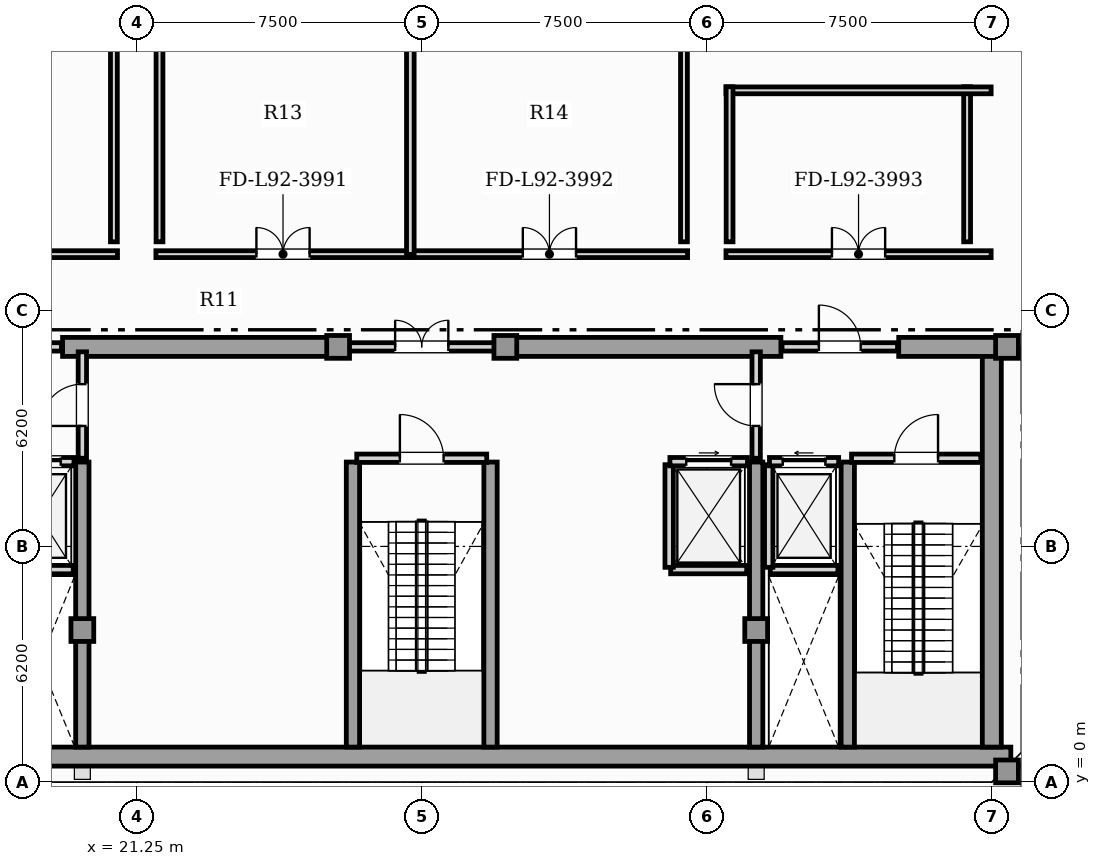
"""IFC4 building model, lengths in metres.
Left out: names, types, materials, properties, quantities, classifications, styles, units other than length and angle.
Written with IfcOpenShell. Run it as: python <this file> out.ifc"""

import sys

from ifc_helpers import new_model, si_unit, direction, frame, frame_2d, origin, origin_2d, place, context, subcontext, project, spatial, rectangle, hollow_rectangle, extrude, element, fill, save


model = new_model("IFC4")
c1 = context("Model", 3, precision=1e-05, world=origin(), true_north=direction((0.0, 1.0)))
c2 = subcontext(c1, "Body", "Model", "MODEL_VIEW")
j1 = project(units=[si_unit("LENGTHUNIT", "METRE"), si_unit("PLANEANGLEUNIT", "RADIAN")], contexts=[c1])
p1 = place(None, origin())
s1 = spatial("IfcSite", under=j1, at=p1, CompositionType="ELEMENT")
p2 = place(p1, origin())
s2 = spatial("IfcBuilding", under=s1, at=p2, CompositionType="ELEMENT")
p3 = place(p2, frame((0.0, 0.0, 377.45)))
s3 = spatial("IfcBuildingStorey", under=s2, at=p3, CompositionType="ELEMENT", Elevation=377.45)
p4 = place(p3, frame((13.25, 0.67, 0.0), z_axis=(0.0, 0.0, 1.0), x_axis=(1.0, 0.0, 0.0)))
e1 = element("IfcWall", 1, at=p4, inside=s3, PredefinedType="SHEAR", context=c2, shape_type="SweptSolid", body=[
    extrude(rectangle(XDim=31.0, YDim=0.5, at=frame_2d((15.5, 0.0))), origin(), (0.0, 0.0, 1.0), 5.1),
])
p5 = place(p3, frame((43.75, 0.92, 0.0), z_axis=(0.0, 0.0, 1.0), x_axis=(0.0, 1.0, 0.0)))
e2 = element("IfcWall", 2, at=p5, inside=s3, PredefinedType="SHEAR", context=c2, shape_type="SweptSolid", body=[
    extrude(rectangle(XDim=10.53, YDim=0.5, at=frame_2d((5.265, 0.0))), origin(), (0.0, 0.0, 1.0), 5.1),
])
for number, where, z_axis, x_axis in (
    (3, (19.3, 11.45, 0.0), (0.0, 0.0, 1.0), (1.0, 0.0, 0.0)),
    (4, (30.9, 11.45, 0.0), (0.0, 0.0, 1.0), (1.0, 0.0, 0.0)),
):
    element("IfcWall", number, at=place(p3, frame(where, z_axis=z_axis, x_axis=x_axis)), inside=s3, PredefinedType="SHEAR", context=c2, shape_type="SweptSolid", body=[
        extrude(rectangle(XDim=7.3, YDim=0.5, at=frame_2d((3.65, 0.0))), origin(), (0.0, 0.0, 1.0), 5.1),
    ])
p6 = place(p3, frame((41.3, 11.45, 0.0), z_axis=(0.0, 0.0, 1.0), x_axis=(1.0, 0.0, 0.0)))
e5 = element("IfcWall", 5, at=p6, inside=s3, PredefinedType="SHEAR", context=c2, shape_type="SweptSolid", body=[
    extrude(rectangle(XDim=2.95, YDim=0.5, at=frame_2d((1.475, 0.0))), origin(), (0.0, 0.0, 1.0), 5.1),
])
for number, where, z_axis, x_axis in (
    (6, (19.82, 0.92, 0.0), (0.0, 0.0, 1.0), (0.0, 1.0, 0.0)),
    (7, (26.94, 0.92, 0.0), (0.0, 0.0, 1.0), (0.0, 1.0, 0.0)),
    (8, (30.56, 0.92, 0.0), (0.0, 0.0, 1.0), (0.0, 1.0, 0.0)),
    (9, (37.55, 0.92, 0.0), (0.0, 0.0, 1.0), (0.0, 1.0, 0.0)),
    (10, (39.96, 0.92, 0.0), (0.0, 0.0, 1.0), (0.0, 1.0, 0.0)),
):
    element("IfcWall", number, at=place(p3, frame(where, z_axis=z_axis, x_axis=x_axis)), inside=s3, PredefinedType="SHEAR", context=c2, shape_type="SweptSolid", body=[
        extrude(rectangle(XDim=7.5, YDim=0.35, at=frame_2d((3.75, 0.0))), origin(), (0.0, 0.0, 1.0), 5.1),
    ])
for number, where, z_axis, x_axis in (
    (11, (44.15, 0.28, 0.0), (0.0, 0.0, 1.0), (1.0, 0.0, 0.0)),
    (12, (44.15, 11.45, 0.0), (0.0, 0.0, 1.0), (1.0, 0.0, 0.0)),
    (13, (19.82, 4.0, 0.0), (0.0, 0.0, 1.0), (1.0, 0.0, 0.0)),
    (14, (37.55, 4.0, 0.0), (0.0, 0.0, 1.0), (1.0, 0.0, 0.0)),
    (15, (26.55, 11.45, 0.0), (0.0, 0.0, 1.0), (1.0, 0.0, 0.0)),
    (16, (30.95, 11.45, 0.0), (0.0, 0.0, 1.0), (1.0, 0.0, 0.0)),
):
    element("IfcColumn", number, at=place(p3, frame(where, z_axis=z_axis, x_axis=x_axis)), inside=s3, PredefinedType="USERDEFINED", context=c2, shape_type="SweptSolid", body=[
        extrude(hollow_rectangle(XDim=0.6, YDim=0.6, WallThickness=0.04, at=origin_2d()), origin(), (0.0, 0.0, 1.0), 5.4),
    ])
p7 = place(p3, frame((17.8, 5.59, 0.0), z_axis=(0.0, 0.0, 1.0), x_axis=(1.0, 0.0, 0.0)))
e17 = element("IfcWall", 17, at=p7, inside=s3, PredefinedType="SOLIDWALL", context=c2, shape_type="SweptSolid", body=[
    extrude(rectangle(XDim=1.78, YDim=0.22, at=frame_2d((0.89, 0.0))), origin(), (0.0, 0.0, 1.0), 5.1),
])
p8 = place(p3, frame((17.78, 8.43, 0.0), z_axis=(0.0, 0.0, 1.0), x_axis=(1.0, 0.0, 0.0)))
e18 = element("IfcWall", 18, at=p8, inside=s3, PredefinedType="SOLIDWALL", context=c2, shape_type="SweptSolid", body=[
    extrude(rectangle(XDim=1.82, YDim=0.22, at=frame_2d((0.91, 0.0))), origin(), (0.0, 0.0, 1.0), 5.1),
])
p9 = place(p8, frame((0.35, 0.0, 0.0)))
e19 = element("IfcOpeningElement", 19, at=p9, cuts=e18, PredefinedType="OPENING", context=c2, shape_type="SweptSolid", body=[
    extrude(rectangle(XDim=1.12, YDim=2.25, at=frame_2d((0.56, 1.125))), frame((0.0, 0.12, 0.0), z_axis=(0.0, -1.0, 0.0), x_axis=(1.0, 0.0, 0.0)), (0.0, 0.0, 1.0), 0.24),
])
p10 = place(p3, frame((37.92, 5.59, 0.0), z_axis=(0.0, 0.0, 1.0), x_axis=(1.0, 0.0, 0.0)))
e20 = element("IfcWall", 20, at=p10, inside=s3, PredefinedType="SOLIDWALL", context=c2, shape_type="SweptSolid", body=[
    extrude(rectangle(XDim=1.78, YDim=0.22, at=frame_2d((0.89, 0.0))), origin(), (0.0, 0.0, 1.0), 5.1),
])
p11 = place(p3, frame((37.88, 5.65, 0.0), z_axis=(0.0, 0.0, 1.0), x_axis=(0.0, 1.0, 0.0)))
e21 = element("IfcWall", 21, at=p11, inside=s3, PredefinedType="SOLIDWALL", context=c2, shape_type="SweptSolid", body=[
    extrude(rectangle(XDim=2.7, YDim=0.22, at=frame_2d((1.35, 0.0))), origin(), (0.0, 0.0, 1.0), 5.1),
])
p12 = place(p3, frame((37.9, 8.43, 0.0), z_axis=(0.0, 0.0, 1.0), x_axis=(1.0, 0.0, 0.0)))
e22 = element("IfcWall", 22, at=p12, inside=s3, PredefinedType="SOLIDWALL", context=c2, shape_type="SweptSolid", body=[
    extrude(rectangle(XDim=1.82, YDim=0.22, at=frame_2d((0.91, 0.0))), origin(), (0.0, 0.0, 1.0), 5.1),
])
p13 = place(p12, frame((0.35, 0.0, 0.0)))
e23 = element("IfcOpeningElement", 23, at=p13, cuts=e22, PredefinedType="OPENING", context=c2, shape_type="SweptSolid", body=[
    extrude(rectangle(XDim=1.12, YDim=2.25, at=frame_2d((0.56, 1.125))), frame((0.0, 0.12, 0.0), z_axis=(0.0, -1.0, 0.0), x_axis=(1.0, 0.0, 0.0)), (0.0, 0.0, 1.0), 0.24),
])
p14 = place(p3, frame((35.3, 5.59, 0.0), z_axis=(0.0, 0.0, 1.0), x_axis=(1.0, 0.0, 0.0)))
e24 = element("IfcWall", 24, at=p14, inside=s3, PredefinedType="SOLIDWALL", context=c2, shape_type="SweptSolid", body=[
    extrude(rectangle(XDim=2.0, YDim=0.22, at=frame_2d((1.0, 0.0))), origin(), (0.0, 0.0, 1.0), 5.1),
])
p15 = place(p3, frame((35.26, 5.65, 0.0), z_axis=(0.0, 0.0, 1.0), x_axis=(0.0, 1.0, 0.0)))
e25 = element("IfcWall", 25, at=p15, inside=s3, PredefinedType="SOLIDWALL", context=c2, shape_type="SweptSolid", body=[
    extrude(rectangle(XDim=2.7, YDim=0.22, at=frame_2d((1.35, 0.0))), origin(), (0.0, 0.0, 1.0), 5.1),
])
p16 = place(p3, frame((35.28, 8.43, 0.0), z_axis=(0.0, 0.0, 1.0), x_axis=(1.0, 0.0, 0.0)))
e26 = element("IfcWall", 26, at=p16, inside=s3, PredefinedType="SOLIDWALL", context=c2, shape_type="SweptSolid", body=[
    extrude(rectangle(XDim=2.04, YDim=0.22, at=frame_2d((1.02, 0.0))), origin(), (0.0, 0.0, 1.0), 5.1),
])
p17 = place(p16, frame((0.43, 0.0, 0.0)))
e27 = element("IfcOpeningElement", 27, at=p17, cuts=e26, PredefinedType="OPENING", context=c2, shape_type="SweptSolid", body=[
    extrude(rectangle(XDim=1.18, YDim=2.2, at=frame_2d((0.59, 1.1))), frame((0.0, 0.12, 0.0), z_axis=(0.0, -1.0, 0.0), x_axis=(1.0, 0.0, 0.0)), (0.0, 0.0, 1.0), 0.24),
])
p18 = place(p3, frame((40.06, 8.52, 0.0), z_axis=(0.0, 0.0, 1.0), x_axis=(1.0, 0.0, 0.0)))
e28 = element("IfcWall", 28, at=p18, inside=s3, PredefinedType="SOLIDWALL", context=c2, shape_type="SweptSolid", body=[
    extrude(rectangle(XDim=3.4, YDim=0.22, at=frame_2d((1.7, 0.0))), origin(), (0.0, 0.0, 1.0), 5.1),
])
p19 = place(p18, frame((1.125, 0.0, 0.0)))
e29 = element("IfcOpeningElement", 29, at=p19, cuts=e28, PredefinedType="OPENING", context=c2, shape_type="SweptSolid", body=[
    extrude(rectangle(XDim=1.15, YDim=2.2, at=frame_2d((0.575, 1.1))), frame((0.0, 0.12, 0.0), z_axis=(0.0, -1.0, 0.0), x_axis=(1.0, 0.0, 0.0)), (0.0, 0.0, 1.0), 0.24),
])
p20 = place(p3, frame((27.04, 8.52, 0.0), z_axis=(0.0, 0.0, 1.0), x_axis=(1.0, 0.0, 0.0)))
e30 = element("IfcWall", 30, at=p20, inside=s3, PredefinedType="SOLIDWALL", context=c2, shape_type="SweptSolid", body=[
    extrude(rectangle(XDim=3.42, YDim=0.22, at=frame_2d((1.71, 0.0))), origin(), (0.0, 0.0, 1.0), 5.1),
])
p21 = place(p20, frame((1.135, 0.0, 0.0)))
e31 = element("IfcOpeningElement", 31, at=p21, cuts=e30, PredefinedType="OPENING", context=c2, shape_type="SweptSolid", body=[
    extrude(rectangle(XDim=1.15, YDim=2.2, at=frame_2d((0.575, 1.1))), frame((0.0, 0.12, 0.0), z_axis=(0.0, -1.0, 0.0), x_axis=(1.0, 0.0, 0.0)), (0.0, 0.0, 1.0), 0.24),
])
p22 = place(p3, frame((19.82, 8.52, 0.0), z_axis=(0.0, 0.0, 1.0), x_axis=(0.0, 1.0, 0.0)))
e32 = element("IfcWall", 32, at=p22, inside=s3, PredefinedType="SOLIDWALL", context=c2, shape_type="SweptSolid", body=[
    extrude(rectangle(XDim=2.8, YDim=0.22, at=frame_2d((1.4, 0.0))), origin(), (0.0, 0.0, 1.0), 4.556),
])
p23 = place(p22, frame((0.85, 0.0, 0.0)))
e33 = element("IfcOpeningElement", 33, at=p23, cuts=e32, PredefinedType="OPENING", context=c2, shape_type="SweptSolid", body=[
    extrude(rectangle(XDim=1.1, YDim=2.2, at=frame_2d((0.55, 1.1))), frame((0.0, 0.12, 0.0), z_axis=(0.0, -1.0, 0.0), x_axis=(1.0, 0.0, 0.0)), (0.0, 0.0, 1.0), 0.24),
])
p24 = place(p3, frame((37.55, 8.52, 0.0), z_axis=(0.0, 0.0, 1.0), x_axis=(0.0, 1.0, 0.0)))
e34 = element("IfcWall", 34, at=p24, inside=s3, PredefinedType="SOLIDWALL", context=c2, shape_type="SweptSolid", body=[
    extrude(rectangle(XDim=2.8, YDim=0.22, at=frame_2d((1.4, 0.0))), origin(), (0.0, 0.0, 1.0), 4.556),
])
p25 = place(p24, frame((0.85, 0.0, 0.0)))
e35 = element("IfcOpeningElement", 35, at=p25, cuts=e34, PredefinedType="OPENING", context=c2, shape_type="SweptSolid", body=[
    extrude(rectangle(XDim=1.1, YDim=2.2, at=frame_2d((0.55, 1.1))), frame((0.0, 0.12, 0.0), z_axis=(0.0, -1.0, 0.0), x_axis=(1.0, 0.0, 0.0)), (0.0, 0.0, 1.0), 0.24),
])
p26 = place(p3, frame((16.23, 11.45, 0.0), z_axis=(0.0, 0.0, 1.0), x_axis=(1.0, 0.0, 0.0)))
e36 = element("IfcWall", 36, at=p26, inside=s3, PredefinedType="SOLIDWALL", context=c2, shape_type="SweptSolid", body=[
    extrude(rectangle(XDim=3.04, YDim=0.22, at=frame_2d((1.52, 0.0))), origin(), (0.0, 0.0, 1.0), 5.1),
])
p27 = place(p26, frame((0.97, 0.0, 0.0)))
e37 = element("IfcOpeningElement", 37, at=p27, cuts=e36, PredefinedType="OPENING", context=c2, shape_type="SweptSolid", body=[
    extrude(rectangle(XDim=1.1, YDim=2.2, at=frame_2d((0.55, 1.1))), frame((0.0, 0.12, 0.0), z_axis=(0.0, -1.0, 0.0), x_axis=(1.0, 0.0, 0.0)), (0.0, 0.0, 1.0), 0.24),
])
p28 = place(p3, frame((26.63, 11.45, 0.0), z_axis=(0.0, 0.0, 1.0), x_axis=(1.0, 0.0, 0.0)))
e38 = element("IfcWall", 38, at=p28, inside=s3, PredefinedType="SOLIDWALL", context=c2, shape_type="SweptSolid", body=[
    extrude(rectangle(XDim=4.24, YDim=0.22, at=frame_2d((2.12, 0.0))), origin(), (0.0, 0.0, 1.0), 5.1),
])
p29 = place(p28, frame((1.42, 0.0, 0.0)))
e39 = element("IfcOpeningElement", 39, at=p29, cuts=e38, PredefinedType="OPENING", context=c2, shape_type="SweptSolid", body=[
    extrude(rectangle(XDim=1.4, YDim=2.2, at=frame_2d((0.7, 1.1))), frame((0.0, 0.12, 0.0), z_axis=(0.0, -1.0, 0.0), x_axis=(1.0, 0.0, 0.0)), (0.0, 0.0, 1.0), 0.24),
])
p30 = place(p3, frame((38.23, 11.45, 0.0), z_axis=(0.0, 0.0, 1.0), x_axis=(1.0, 0.0, 0.0)))
e40 = element("IfcWall", 40, at=p30, inside=s3, PredefinedType="SOLIDWALL", context=c2, shape_type="SweptSolid", body=[
    extrude(rectangle(XDim=3.04, YDim=0.22, at=frame_2d((1.52, 0.0))), origin(), (0.0, 0.0, 1.0), 5.1),
])
p31 = place(p30, frame((0.97, 0.0, 0.0)))
e41 = element("IfcOpeningElement", 41, at=p31, cuts=e40, PredefinedType="OPENING", context=c2, shape_type="SweptSolid", body=[
    extrude(rectangle(XDim=1.1, YDim=2.2, at=frame_2d((0.55, 1.1))), frame((0.0, 0.12, 0.0), z_axis=(0.0, -1.0, 0.0), x_axis=(1.0, 0.0, 0.0)), (0.0, 0.0, 1.0), 0.24),
])
p32 = place(p3, frame((13.768, 13.89, 0.0), z_axis=(0.0, 0.0, 1.0), x_axis=(1.0, 0.0, 0.0)))
e42 = element("IfcWall", 42, at=p32, inside=s3, PredefinedType="PARTITIONING", context=c2, shape_type="SweptSolid", body=[
    extrude(rectangle(XDim=6.977, YDim=0.18, at=frame_2d((3.489, 0.0))), origin(), (0.0, 0.0, 1.0), 5.1),
])
p33 = place(p32, frame((2.789, 0.0, 0.0)))
e43 = element("IfcOpeningElement", 43, at=p33, cuts=e42, PredefinedType="OPENING", context=c2, shape_type="SweptSolid", body=[
    extrude(rectangle(XDim=1.4, YDim=2.2, at=frame_2d((0.7, 1.1))), frame((0.0, 0.1, 0.0), z_axis=(0.0, -1.0, 0.0), x_axis=(1.0, 0.0, 0.0)), (0.0, 0.0, 1.0), 0.2),
])
p34 = place(p3, frame((21.755, 13.89, 0.0), z_axis=(0.0, 0.0, 1.0), x_axis=(1.0, 0.0, 0.0)))
e44 = element("IfcWall", 44, at=p34, inside=s3, PredefinedType="PARTITIONING", context=c2, shape_type="SweptSolid", body=[
    extrude(rectangle(XDim=6.69, YDim=0.18, at=frame_2d((3.345, 0.0))), origin(), (0.0, 0.0, 1.0), 5.1),
])
p35 = place(p34, frame((2.645, 0.0, 0.0)))
e45 = element("IfcOpeningElement", 45, at=p35, cuts=e44, PredefinedType="OPENING", context=c2, shape_type="SweptSolid", body=[
    extrude(rectangle(XDim=1.4, YDim=2.2, at=frame_2d((0.7, 1.1))), frame((0.0, 0.1, 0.0), z_axis=(0.0, -1.0, 0.0), x_axis=(1.0, 0.0, 0.0)), (0.0, 0.0, 1.0), 0.2),
])
p36 = place(p3, frame((28.475, 13.89, 0.0), z_axis=(0.0, 0.0, 1.0), x_axis=(1.0, 0.0, 0.0)))
e46 = element("IfcWall", 46, at=p36, inside=s3, PredefinedType="PARTITIONING", context=c2, shape_type="SweptSolid", body=[
    extrude(rectangle(XDim=7.27, YDim=0.18, at=frame_2d((3.635, 0.0))), origin(), (0.0, 0.0, 1.0), 5.1),
])
p37 = place(p36, frame((2.935, 0.0, 0.0)))
e47 = element("IfcOpeningElement", 47, at=p37, cuts=e46, PredefinedType="OPENING", context=c2, shape_type="SweptSolid", body=[
    extrude(rectangle(XDim=1.4, YDim=2.2, at=frame_2d((0.7, 1.1))), frame((0.0, 0.1, 0.0), z_axis=(0.0, -1.0, 0.0), x_axis=(1.0, 0.0, 0.0)), (0.0, 0.0, 1.0), 0.2),
])
p38 = place(p3, frame((36.755, 13.89, 0.0), z_axis=(0.0, 0.0, 1.0), x_axis=(1.0, 0.0, 0.0)))
e48 = element("IfcWall", 48, at=p38, inside=s3, PredefinedType="PARTITIONING", context=c2, shape_type="SweptSolid", body=[
    extrude(rectangle(XDim=6.977, YDim=0.18, at=frame_2d((3.489, 0.0))), origin(), (0.0, 0.0, 1.0), 5.1),
])
p39 = place(p38, frame((2.789, 0.0, 0.0)))
e49 = element("IfcOpeningElement", 49, at=p39, cuts=e48, PredefinedType="OPENING", context=c2, shape_type="SweptSolid", body=[
    extrude(rectangle(XDim=1.4, YDim=2.2, at=frame_2d((0.7, 1.1))), frame((0.0, 0.1, 0.0), z_axis=(0.0, -1.0, 0.0), x_axis=(1.0, 0.0, 0.0)), (0.0, 0.0, 1.0), 0.2),
])
p40 = place(p3, frame((28.45, 13.885, 0.0), z_axis=(0.0, 0.0, 1.0), x_axis=(0.0, 1.0, 0.0)))
e50 = element("IfcWall", 50, at=p40, inside=s3, PredefinedType="PARTITIONING", context=c2, shape_type="SweptSolid", body=[
    extrude(rectangle(XDim=8.097, YDim=0.2, at=frame_2d((4.048, 0.0))), origin(), (0.0, 0.0, 1.0), 5.1),
])
for number, where, z_axis, x_axis in (
    (51, (20.65, 14.215, 0.0), (0.0, 0.0, 1.0), (0.0, 1.0, 0.0)),
    (52, (21.85, 21.982, 0.0), (0.0, 0.0, 1.0), (0.0, -1.0, 0.0)),
    (53, (35.65, 14.215, 0.0), (0.0, 0.0, 1.0), (0.0, 1.0, 0.0)),
):
    element("IfcWall", number, at=place(p3, frame(where, z_axis=z_axis, x_axis=x_axis)), inside=s3, PredefinedType="PARTITIONING", context=c2, shape_type="SweptSolid", body=[
        extrude(rectangle(XDim=7.767, YDim=0.18, at=frame_2d((3.883, 0.0))), origin(), (0.0, 0.0, 1.0), 5.1),
    ])
p41 = place(p3, frame((43.1, 14.215, 0.0), z_axis=(0.0, 0.0, 1.0), x_axis=(0.0, 1.0, 0.0)))
e54 = element("IfcWall", 54, at=p41, inside=s3, PredefinedType="PARTITIONING", context=c2, shape_type="SweptSolid", body=[
    extrude(rectangle(XDim=4.08, YDim=0.18, at=frame_2d((2.04, 0.0))), origin(), (0.0, 0.0, 1.0), 5.1),
])
p42 = place(p3, frame((43.732, 18.2, 0.0), z_axis=(0.0, 0.0, 1.0), x_axis=(-1.0, 0.0, 0.0)))
e55 = element("IfcWall", 55, at=p42, inside=s3, PredefinedType="PARTITIONING", context=c2, shape_type="SweptSolid", body=[
    extrude(rectangle(XDim=6.977, YDim=0.18, at=frame_2d((3.489, 0.0))), origin(), (0.0, 0.0, 1.0), 5.1),
])
p43 = place(p3, frame((36.85, 18.295, 0.0), z_axis=(0.0, 0.0, 1.0), x_axis=(0.0, -1.0, 0.0)))
e56 = element("IfcWall", 56, at=p43, inside=s3, PredefinedType="PARTITIONING", context=c2, shape_type="SweptSolid", body=[
    extrude(rectangle(XDim=4.08, YDim=0.18, at=frame_2d((2.04, 0.0))), origin(), (0.0, 0.0, 1.0), 5.1),
])
p44 = place(p9, origin())
e57 = element("IfcDoor", 57, at=p44, inside=s3, OperationType="SLIDING_TO_RIGHT", PredefinedType="DOOR", context=c2, shape_type="SweptSolid", body=[
    extrude(rectangle(XDim=1.12, YDim=2.25, at=frame_2d((0.56, 1.125))), frame((0.0, 0.025, 0.0), z_axis=(0.0, -1.0, 0.0), x_axis=(1.0, 0.0, 0.0)), (0.0, 0.0, 1.0), 0.05),
])
fill(e19, e57)
p45 = place(p13, origin())
e58 = element("IfcDoor", 58, at=p45, inside=s3, OperationType="SLIDING_TO_LEFT", PredefinedType="DOOR", context=c2, shape_type="SweptSolid", body=[
    extrude(rectangle(XDim=1.12, YDim=2.25, at=frame_2d((0.56, 1.125))), frame((0.0, 0.025, 0.0), z_axis=(0.0, -1.0, 0.0), x_axis=(1.0, 0.0, 0.0)), (0.0, 0.0, 1.0), 0.05),
])
fill(e23, e58)
p46 = place(p17, origin())
e59 = element("IfcDoor", 59, at=p46, inside=s3, OperationType="SLIDING_TO_RIGHT", PredefinedType="DOOR", context=c2, shape_type="SweptSolid", body=[
    extrude(rectangle(XDim=1.18, YDim=2.2, at=frame_2d((0.59, 1.1))), frame((0.0, 0.025, 0.0), z_axis=(0.0, -1.0, 0.0), x_axis=(1.0, 0.0, 0.0)), (0.0, 0.0, 1.0), 0.05),
])
fill(e27, e59)
p47 = place(p19, origin())
e60 = element("IfcDoor", 60, at=p47, inside=s3, OperationType="SINGLE_SWING_RIGHT", PredefinedType="DOOR", context=c2, shape_type="SweptSolid", body=[
    extrude(rectangle(XDim=1.15, YDim=2.2, at=frame_2d((0.575, 1.1))), frame((0.0, 0.025, 0.0), z_axis=(0.0, -1.0, 0.0), x_axis=(1.0, 0.0, 0.0)), (0.0, 0.0, 1.0), 0.05),
])
fill(e29, e60)
p48 = place(p21, origin())
e61 = element("IfcDoor", 61, at=p48, inside=s3, OperationType="SINGLE_SWING_LEFT", PredefinedType="DOOR", context=c2, shape_type="SweptSolid", body=[
    extrude(rectangle(XDim=1.15, YDim=2.2, at=frame_2d((0.575, 1.1))), frame((0.0, 0.025, 0.0), z_axis=(0.0, -1.0, 0.0), x_axis=(1.0, 0.0, 0.0)), (0.0, 0.0, 1.0), 0.05),
])
fill(e31, e61)
p49 = place(p23, origin())
e62 = element("IfcDoor", 62, at=p49, inside=s3, OperationType="SINGLE_SWING_LEFT", PredefinedType="DOOR", context=c2, shape_type="SweptSolid", body=[
    extrude(rectangle(XDim=1.1, YDim=2.2, at=frame_2d((0.55, 1.1))), frame((0.0, 0.025, 0.0), z_axis=(0.0, -1.0, 0.0), x_axis=(1.0, 0.0, 0.0)), (0.0, 0.0, 1.0), 0.05),
])
fill(e33, e62)
p50 = place(p25, origin())
e63 = element("IfcDoor", 63, at=p50, inside=s3, OperationType="SINGLE_SWING_RIGHT", PredefinedType="DOOR", context=c2, shape_type="SweptSolid", body=[
    extrude(rectangle(XDim=1.1, YDim=2.2, at=frame_2d((0.55, 1.1))), frame((0.0, 0.025, 0.0), z_axis=(0.0, -1.0, 0.0), x_axis=(1.0, 0.0, 0.0)), (0.0, 0.0, 1.0), 0.05),
])
fill(e35, e63)
p51 = place(p29, origin())
e64 = element("IfcDoor", 64, at=p51, inside=s3, OperationType="DOUBLE_DOOR_SINGLE_SWING", PredefinedType="DOOR", context=c2, shape_type="SweptSolid", body=[
    extrude(rectangle(XDim=1.4, YDim=2.2, at=frame_2d((0.7, 1.1))), frame((0.0, 0.025, 0.0), z_axis=(0.0, -1.0, 0.0), x_axis=(1.0, 0.0, 0.0)), (0.0, 0.0, 1.0), 0.05),
])
fill(e39, e64)
p52 = place(p31, origin())
e65 = element("IfcDoor", 65, at=p52, inside=s3, OperationType="SINGLE_SWING_LEFT", PredefinedType="DOOR", context=c2, shape_type="SweptSolid", body=[
    extrude(rectangle(XDim=1.1, YDim=2.2, at=frame_2d((0.55, 1.1))), frame((0.0, 0.025, 0.0), z_axis=(0.0, -1.0, 0.0), x_axis=(1.0, 0.0, 0.0)), (0.0, 0.0, 1.0), 0.05),
])
fill(e41, e65)
p53 = place(p35, origin())
e66 = element("IfcDoor", 66, at=p53, inside=s3, OperationType="DOUBLE_DOOR_SINGLE_SWING", PredefinedType="DOOR", context=c2, shape_type="SweptSolid", body=[
    extrude(rectangle(XDim=1.4, YDim=2.2, at=frame_2d((0.7, 1.1))), frame((0.0, 0.025, 0.0), z_axis=(0.0, -1.0, 0.0), x_axis=(1.0, 0.0, 0.0)), (0.0, 0.0, 1.0), 0.05),
])
fill(e45, e66)
p54 = place(p37, origin())
e67 = element("IfcDoor", 67, at=p54, inside=s3, OperationType="DOUBLE_DOOR_SINGLE_SWING", PredefinedType="DOOR", context=c2, shape_type="SweptSolid", body=[
    extrude(rectangle(XDim=1.4, YDim=2.2, at=frame_2d((0.7, 1.1))), frame((0.0, 0.025, 0.0), z_axis=(0.0, -1.0, 0.0), x_axis=(1.0, 0.0, 0.0)), (0.0, 0.0, 1.0), 0.05),
])
fill(e47, e67)
p55 = place(p39, origin())
e68 = element("IfcDoor", 68, at=p55, inside=s3, OperationType="DOUBLE_DOOR_SINGLE_SWING", PredefinedType="DOOR", context=c2, shape_type="SweptSolid", body=[
    extrude(rectangle(XDim=1.4, YDim=2.2, at=frame_2d((0.7, 1.1))), frame((0.0, 0.025, 0.0), z_axis=(0.0, -1.0, 0.0), x_axis=(1.0, 0.0, 0.0)), (0.0, 0.0, 1.0), 0.05),
])
fill(e49, e68)
save(model, sys.argv[1])
